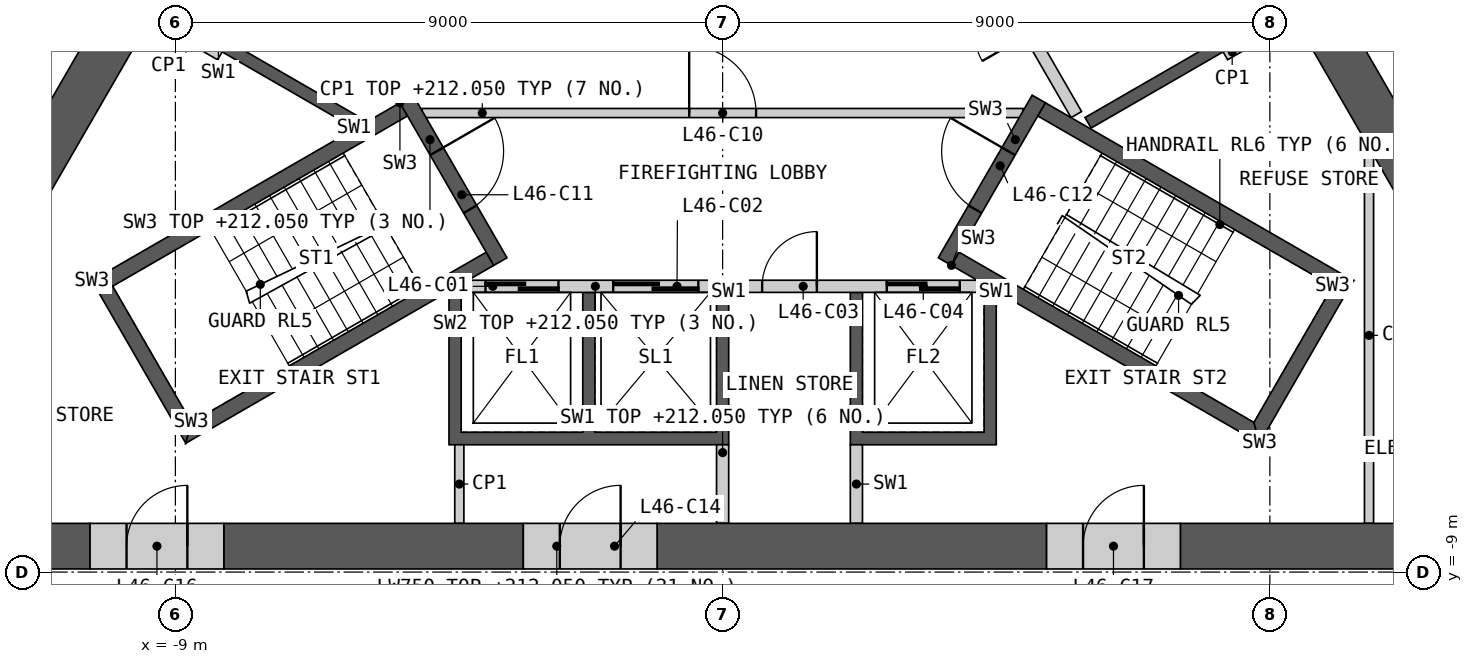
"""IFC4 building model, lengths in metres.
Left out: names, types, materials, properties, quantities, classifications, styles, units other than length and angle.
Written with IfcOpenShell. Run it as: python <this file> out.ifc"""

import sys

from ifc_helpers import new_model, si_unit, direction, frame, frame_2d, origin, place, context, subcontext, project, spatial, polyline, rectangle, outline, extrude, element, fill, save


model = new_model("IFC4")
c1 = context("Model", 3, precision=1e-05, world=origin(), true_north=direction((0.0, 1.0)))
c2 = subcontext(c1, "Body", "Model", "MODEL_VIEW")
j1 = project(units=[si_unit("LENGTHUNIT", "METRE"), si_unit("PLANEANGLEUNIT", "RADIAN")], contexts=[c1])
p1 = place(None, origin())
s1 = spatial("IfcSite", under=j1, at=p1, CompositionType="ELEMENT")
p2 = place(p1, origin())
s2 = spatial("IfcBuilding", under=s1, at=p2, CompositionType="ELEMENT")
p3 = place(p2, frame((0.0, 0.0, 208.8)))
s3 = spatial("IfcBuildingStorey", under=s2, at=p3, CompositionType="ELEMENT", Elevation=208.8)
p4 = place(p3, origin())
e1 = element("IfcWall", 1, at=p4, inside=s3, PredefinedType="SHEAR", context=c2, shape_type="SweptSolid", body=[
    extrude(outline(polyline([(4.5, -4.4), (4.5, -6.906), (2.1, -6.906), (2.1, -4.4), (2.3, -4.4), (2.3, -6.7), (4.3, -6.7), (4.3, -4.4), (4.5, -4.4)])), origin(), (0.0, 0.0, 1.0), 3.25),
])
p5 = place(p3, origin())
e2 = element("IfcWall", 2, at=p5, inside=s3, PredefinedType="SHEAR", context=c2, shape_type="SweptSolid", body=[
    extrude(outline(polyline([(0.1, -4.4), (0.1, -6.906), (-4.5, -6.906), (-4.5, -4.4), (-4.3, -4.4), (-4.3, -6.7), (-2.3, -6.7), (-2.3, -4.4), (-2.1, -4.4), (-2.1, -6.7), (-0.1, -6.7), (-0.1, -4.4), (0.1, -4.4)])), origin(), (0.0, 0.0, 1.0), 3.25),
])
p6 = place(p3, frame((-4.187, -4.3, 0.0), z_axis=(0.0, 0.0, 1.0), x_axis=(1.0, 0.0, 0.0)))
e3 = element("IfcWall", 3, at=p6, inside=s3, PredefinedType="SOLIDWALL", context=c2, shape_type="SweptSolid", body=[
    extrude(rectangle(XDim=8.373, YDim=0.2, at=frame_2d((4.187, 0.0))), origin(), (0.0, 0.0, 1.0), 3.25),
])
p7 = place(p6, frame((0.287, 0.0, 0.0)))
e4 = element("IfcOpeningElement", 4, at=p7, cuts=e3, PredefinedType="OPENING", context=c2, shape_type="SweptSolid", body=[
    extrude(rectangle(XDim=1.2, YDim=2.1, at=frame_2d((0.6, 1.05))), frame((0.0, 0.11, 0.0), z_axis=(0.0, -1.0, 0.0), x_axis=(1.0, 0.0, 0.0)), (0.0, 0.0, 1.0), 0.22),
])
p8 = place(p6, frame((2.387, 0.0, 0.0)))
e5 = element("IfcOpeningElement", 5, at=p8, cuts=e3, PredefinedType="OPENING", context=c2, shape_type="SweptSolid", body=[
    extrude(rectangle(XDim=1.4, YDim=2.1, at=frame_2d((0.7, 1.05))), frame((0.0, 0.11, 0.0), z_axis=(0.0, -1.0, 0.0), x_axis=(1.0, 0.0, 0.0)), (0.0, 0.0, 1.0), 0.22),
])
p9 = place(p6, frame((4.837, 0.0, 0.0)))
e6 = element("IfcOpeningElement", 6, at=p9, cuts=e3, PredefinedType="OPENING", context=c2, shape_type="SweptSolid", body=[
    extrude(rectangle(XDim=0.9, YDim=2.1, at=frame_2d((0.45, 1.05))), frame((0.0, 0.11, 0.0), z_axis=(0.0, -1.0, 0.0), x_axis=(1.0, 0.0, 0.0)), (0.0, 0.0, 1.0), 0.22),
])
p10 = place(p6, frame((6.887, 0.0, 0.0)))
e7 = element("IfcOpeningElement", 7, at=p10, cuts=e3, PredefinedType="OPENING", context=c2, shape_type="SweptSolid", body=[
    extrude(rectangle(XDim=1.2, YDim=2.1, at=frame_2d((0.6, 1.05))), frame((0.0, 0.11, 0.0), z_axis=(0.0, -1.0, 0.0), x_axis=(1.0, 0.0, 0.0)), (0.0, 0.0, 1.0), 0.22),
])
for number, where, z_axis, x_axis in (
    (8, (0.0, -6.906, 0.0), (0.0, 0.0, 1.0), (0.0, -1.0, 0.0)),
    (9, (2.2, -6.906, 0.0), (0.0, 0.0, 1.0), (0.0, -1.0, 0.0)),
):
    element("IfcWall", number, at=place(p3, frame(where, z_axis=z_axis, x_axis=x_axis)), inside=s3, PredefinedType="SHEAR", context=c2, shape_type="SweptSolid", body=[
        extrude(rectangle(XDim=1.293, YDim=0.2, at=frame_2d((0.646, 0.0))), origin(), (0.0, 0.0, 1.0), 3.25),
    ])
p11 = place(p3, origin())
e10 = element("IfcWall", 10, at=p11, inside=s3, PredefinedType="SHEAR", context=c2, shape_type="SweptSolid", body=[
    extrude(outline(polyline([(3.76, 2.287), (5.931, 3.54), (8.231, -0.444), (6.061, -1.697), (5.96, -1.524), (7.952, -0.374), (5.852, 3.263), (3.861, 2.113), (3.76, 2.287)])), origin(), (0.0, 0.0, 1.0), 3.25),
])
p12 = place(p3, frame((5.817, -1.476, 0.0), z_axis=(0.0, 0.0, 1.0), x_axis=(-0.500002616675, 0.866023893041, 0.0)))
e11 = element("IfcWall", 11, at=p12, inside=s3, PredefinedType="SOLIDWALL", context=c2, shape_type="SweptSolid", body=[
    extrude(rectangle(XDim=8.373, YDim=0.2, at=frame_2d((4.187, 0.0))), origin(), (0.0, 0.0, 1.0), 3.25),
])
p13 = place(p12, frame((1.537, 0.0, 0.0)))
e12 = element("IfcOpeningElement", 12, at=p13, cuts=e11, PredefinedType="OPENING", context=c2, shape_type="SweptSolid", body=[
    extrude(rectangle(XDim=0.9, YDim=2.1, at=frame_2d((0.45, 1.05))), frame((0.0, 0.11, 0.0), z_axis=(0.0, -1.0, 0.0), x_axis=(1.0, 0.0, 0.0)), (0.0, 0.0, 1.0), 0.22),
])
p14 = place(p12, frame((4.837, 0.0, 0.0)))
e13 = element("IfcOpeningElement", 13, at=p14, cuts=e11, PredefinedType="OPENING", context=c2, shape_type="SweptSolid", body=[
    extrude(rectangle(XDim=0.9, YDim=2.1, at=frame_2d((0.45, 1.05))), frame((0.0, 0.11, 0.0), z_axis=(0.0, -1.0, 0.0), x_axis=(1.0, 0.0, 0.0)), (0.0, 0.0, 1.0), 0.22),
])
p15 = place(p12, frame((6.937, 0.0, 0.0)))
e14 = element("IfcOpeningElement", 14, at=p15, cuts=e11, PredefinedType="OPENING", context=c2, shape_type="SweptSolid", body=[
    extrude(rectangle(XDim=1.1, YDim=2.1, at=frame_2d((0.55, 1.05))), frame((0.0, 0.11, 0.0), z_axis=(0.0, -1.0, 0.0), x_axis=(1.0, 0.0, 0.0)), (0.0, 0.0, 1.0), 0.22),
])
p16 = place(p3, origin())
e15 = element("IfcWall", 15, at=p16, inside=s3, PredefinedType="SHEAR", context=c2, shape_type="SweptSolid", body=[
    extrude(outline(polyline([(-6.061, -1.697), (-8.231, -0.444), (-8.131, -0.271), (-5.96, -1.524), (-6.061, -1.697)])), origin(), (0.0, 0.0, 1.0), 3.25),
])
p17 = place(p3, frame((-4.941, -1.45, 0.0), z_axis=(0.0, 0.0, 1.0), x_axis=(1.0, 0.0, 0.0)))
e16 = element("IfcWall", 16, at=p17, inside=s3, PredefinedType="PARTITIONING", context=c2, shape_type="SweptSolid", body=[
    extrude(rectangle(XDim=9.882, YDim=0.15, at=frame_2d((4.941, 0.0))), origin(), (0.0, 0.0, 1.0), 3.25),
])
p18 = place(p17, frame((4.391, 0.0, 0.0)))
e17 = element("IfcOpeningElement", 17, at=p18, cuts=e16, PredefinedType="OPENING", context=c2, shape_type="SweptSolid", body=[
    extrude(rectangle(XDim=1.1, YDim=2.1, at=frame_2d((0.55, 1.05))), frame((0.0, 0.085, 0.0), z_axis=(0.0, -1.0, 0.0), x_axis=(1.0, 0.0, 0.0)), (0.0, 0.0, 1.0), 0.17),
])
p19 = place(p3, origin())
e18 = element("IfcWall", 18, at=p19, inside=s3, PredefinedType="SHEAR", context=c2, shape_type="SweptSolid", body=[
    extrude(outline(polyline([(-5.307, -1.281), (-10.374, -4.206), (-10.032, -4.298), (-5.182, -1.498), (-5.307, -1.281)])), origin(), (0.0, 0.0, 1.0), 3.25),
])
p20 = place(p3, origin())
e19 = element("IfcWall", 19, at=p20, inside=s3, PredefinedType="SHEAR", context=c2, shape_type="SweptSolid", body=[
    extrude(outline(polyline([(-10.374, -4.206), (-8.83, -6.881), (-8.738, -6.539), (-10.032, -4.298), (-10.374, -4.206)])), origin(), (0.0, 0.0, 1.0), 3.25),
])
p21 = place(p3, origin())
e20 = element("IfcWall", 20, at=p21, inside=s3, PredefinedType="SHEAR", context=c2, shape_type="SweptSolid", body=[
    extrude(outline(polyline([(-8.738, -6.539), (-8.83, -6.881), (-3.763, -3.956), (-3.888, -3.739), (-8.738, -6.539)])), origin(), (0.0, 0.0, 1.0), 3.25),
])
p22 = place(p3, frame((-5.199, -1.219, 0.0), z_axis=(0.0, 0.0, 1.0), x_axis=(0.499982516597, -0.866035497597, 0.0)))
e21 = element("IfcWall", 21, at=p22, inside=s3, PredefinedType="SHEAR", context=c2, shape_type="SweptSolid", body=[
    extrude(rectangle(XDim=3.088, YDim=0.25, at=frame_2d((1.544, 0.0))), origin(), (0.0, 0.0, 1.0), 3.25),
])
p23 = place(p22, frame((0.994, 0.0, 0.0)))
e22 = element("IfcOpeningElement", 22, at=p23, cuts=e21, PredefinedType="OPENING", context=c2, shape_type="SweptSolid", body=[
    extrude(rectangle(XDim=1.1, YDim=2.1, at=frame_2d((0.55, 1.05))), frame((0.0, 0.135, 0.0), z_axis=(0.0, -1.0, 0.0), x_axis=(1.0, 0.0, 0.0)), (0.0, 0.0, 1.0), 0.27),
])
p24 = place(p3, origin())
e23 = element("IfcWall", 23, at=p24, inside=s3, PredefinedType="SHEAR", context=c2, shape_type="SweptSolid", body=[
    extrude(outline(polyline([(3.763, -3.956), (8.83, -6.881), (8.738, -6.539), (3.888, -3.739), (3.763, -3.956)])), origin(), (0.0, 0.0, 1.0), 3.25),
])
p25 = place(p3, origin())
e24 = element("IfcWall", 24, at=p25, inside=s3, PredefinedType="SHEAR", context=c2, shape_type="SweptSolid", body=[
    extrude(outline(polyline([(8.83, -6.881), (10.374, -4.206), (10.032, -4.298), (8.738, -6.539), (8.83, -6.881)])), origin(), (0.0, 0.0, 1.0), 3.25),
])
p26 = place(p3, origin())
e25 = element("IfcWall", 25, at=p26, inside=s3, PredefinedType="SHEAR", context=c2, shape_type="SweptSolid", body=[
    extrude(outline(polyline([(10.032, -4.298), (10.374, -4.206), (5.307, -1.281), (5.182, -1.498), (10.032, -4.298)])), origin(), (0.0, 0.0, 1.0), 3.25),
])
p27 = place(p3, frame((3.655, -3.893, 0.0), z_axis=(0.0, 0.0, 1.0), x_axis=(0.499982516597, 0.866035497597, 0.0)))
e26 = element("IfcWall", 26, at=p27, inside=s3, PredefinedType="SHEAR", context=c2, shape_type="SweptSolid", body=[
    extrude(rectangle(XDim=3.088, YDim=0.25, at=frame_2d((1.544, 0.0))), origin(), (0.0, 0.0, 1.0), 3.25),
])
p28 = place(p27, frame((0.994, 0.0, 0.0)))
e27 = element("IfcOpeningElement", 27, at=p28, cuts=e26, PredefinedType="OPENING", context=c2, shape_type="SweptSolid", body=[
    extrude(rectangle(XDim=1.1, YDim=2.1, at=frame_2d((0.55, 1.05))), frame((0.0, 0.135, 0.0), z_axis=(0.0, -1.0, 0.0), x_axis=(1.0, 0.0, 0.0)), (0.0, 0.0, 1.0), 0.27),
])
for number, where, z_axis, x_axis in (
    (28, (8.268, -0.509, 0.0), (0.0, 0.0, 1.0), (0.866, 0.5, 0.0)),
    (29, (-8.268, -0.509, 0.0), (0.0, 0.0, 1.0), (-0.866, 0.5, 0.0)),
    (30, (-4.33, -8.199, 0.0), (0.0, 0.0, 1.0), (0.0, 1.0, 0.0)),
):
    element("IfcWall", number, at=place(p3, frame(where, z_axis=z_axis, x_axis=x_axis)), inside=s3, PredefinedType="PARTITIONING", context=c2, shape_type="SweptSolid", body=[
        extrude(rectangle(XDim=1.293, YDim=0.15, at=frame_2d((0.646, 0.0))), origin(), (0.0, 0.0, 1.0), 3.25),
    ])
p29 = place(p3, frame((10.631, -8.199, 0.0), z_axis=(0.0, 0.0, 1.0), x_axis=(0.0, 1.0, 0.0)))
e31 = element("IfcWall", 31, at=p29, inside=s3, PredefinedType="PARTITIONING", context=c2, shape_type="SweptSolid", body=[
    extrude(rectangle(XDim=6.184, YDim=0.15, at=frame_2d((3.092, 0.0))), origin(), (0.0, 0.0, 1.0), 3.25),
])
p30 = place(p3, frame((7.528, -8.574, 0.0), z_axis=(0.0, 0.0, 1.0), x_axis=(1.0, 0.0, 0.0)))
e32 = element("IfcWall", 32, at=p30, inside=s3, PredefinedType="SHEAR", context=c2, shape_type="SweptSolid", body=[
    extrude(rectangle(XDim=6.673, YDim=0.75, at=frame_2d((3.336, 0.0))), origin(), (0.0, 0.0, 1.0), 3.25),
])
p31 = place(p3, frame((-1.078, -8.574, 0.0), z_axis=(0.0, 0.0, 1.0), x_axis=(1.0, 0.0, 0.0)))
e33 = element("IfcWall", 33, at=p31, inside=s3, PredefinedType="SHEAR", context=c2, shape_type="SweptSolid", body=[
    extrude(rectangle(XDim=6.406, YDim=0.75, at=frame_2d((3.203, 0.0))), origin(), (0.0, 0.0, 1.0), 3.25),
])
p32 = place(p3, frame((-8.203, -8.574, 0.0), z_axis=(0.0, 0.0, 1.0), x_axis=(1.0, 0.0, 0.0)))
e34 = element("IfcWall", 34, at=p32, inside=s3, PredefinedType="SHEAR", context=c2, shape_type="SweptSolid", body=[
    extrude(rectangle(XDim=4.926, YDim=0.75, at=frame_2d((2.463, 0.0))), origin(), (0.0, 0.0, 1.0), 3.25),
])
p33 = place(p3, frame((-14.201, -8.574, 0.0), z_axis=(0.0, 0.0, 1.0), x_axis=(1.0, 0.0, 0.0)))
e35 = element("IfcWall", 35, at=p33, inside=s3, PredefinedType="SHEAR", context=c2, shape_type="SweptSolid", body=[
    extrude(rectangle(XDim=3.798, YDim=0.75, at=frame_2d((1.899, 0.0))), origin(), (0.0, 0.0, 1.0), 3.25),
])
p34 = place(p3, frame((12.228, -4.032, 0.0), z_axis=(0.0, 0.0, 1.0), x_axis=(-0.499993760127, 0.866029006347, 0.0)))
e36 = element("IfcWall", 36, at=p34, inside=s3, PredefinedType="SHEAR", context=c2, shape_type="SweptSolid", body=[
    extrude(rectangle(XDim=6.206, YDim=0.75, at=frame_2d((3.103, 0.0))), origin(), (0.0, 0.0, 1.0), 3.25),
])
p35 = place(p3, frame((-9.625, 0.477, 0.0), z_axis=(0.0, 0.0, 1.0), x_axis=(-0.499986234705, -0.866033351035, 0.0)))
e37 = element("IfcWall", 37, at=p35, inside=s3, PredefinedType="SHEAR", context=c2, shape_type="SweptSolid", body=[
    extrude(rectangle(XDim=9.801, YDim=0.75, at=frame_2d((4.9, 0.0))), origin(), (0.0, 0.0, 1.0), 3.25),
])
p36 = place(p3, frame((-3.278, -8.574, 0.0), z_axis=(0.0, 0.0, 1.0), x_axis=(1.0, 0.0, 0.0)))
e38 = element("IfcWall", 38, at=p36, inside=s3, PredefinedType="SHEAR", context=c2, shape_type="SweptSolid", body=[
    extrude(rectangle(XDim=2.2, YDim=0.75, at=frame_2d((1.1, 0.0))), origin(), (0.0, 0.0, 1.0), 3.25),
])
p37 = place(p36, frame((0.6, 0.0, 0.0)))
e39 = element("IfcOpeningElement", 39, at=p37, cuts=e38, PredefinedType="OPENING", context=c2, shape_type="SweptSolid", body=[
    extrude(rectangle(XDim=1.0, YDim=2.1, at=frame_2d((0.5, 1.05))), frame((0.0, 0.385, 0.0), z_axis=(0.0, -1.0, 0.0), x_axis=(1.0, 0.0, 0.0)), (0.0, 0.0, 1.0), 0.77),
])
p38 = place(p3, frame((-10.403, -8.574, 0.0), z_axis=(0.0, 0.0, 1.0), x_axis=(1.0, 0.0, 0.0)))
e40 = element("IfcWall", 40, at=p38, inside=s3, PredefinedType="SHEAR", context=c2, shape_type="SweptSolid", body=[
    extrude(rectangle(XDim=2.2, YDim=0.75, at=frame_2d((1.1, 0.0))), origin(), (0.0, 0.0, 1.0), 3.25),
])
p39 = place(p38, frame((0.6, 0.0, 0.0)))
e41 = element("IfcOpeningElement", 41, at=p39, cuts=e40, PredefinedType="OPENING", context=c2, shape_type="SweptSolid", body=[
    extrude(rectangle(XDim=1.0, YDim=2.1, at=frame_2d((0.5, 1.05))), frame((0.0, 0.385, 0.0), z_axis=(0.0, -1.0, 0.0), x_axis=(1.0, 0.0, 0.0)), (0.0, 0.0, 1.0), 0.77),
])
p40 = place(p3, frame((5.328, -8.574, 0.0), z_axis=(0.0, 0.0, 1.0), x_axis=(1.0, 0.0, 0.0)))
e42 = element("IfcWall", 42, at=p40, inside=s3, PredefinedType="SHEAR", context=c2, shape_type="SweptSolid", body=[
    extrude(rectangle(XDim=2.2, YDim=0.75, at=frame_2d((1.1, 0.0))), origin(), (0.0, 0.0, 1.0), 3.25),
])
p41 = place(p40, frame((0.6, 0.0, 0.0)))
e43 = element("IfcOpeningElement", 43, at=p41, cuts=e42, PredefinedType="OPENING", context=c2, shape_type="SweptSolid", body=[
    extrude(rectangle(XDim=1.0, YDim=2.1, at=frame_2d((0.5, 1.05))), frame((0.0, 0.385, 0.0), z_axis=(0.0, -1.0, 0.0), x_axis=(1.0, 0.0, 0.0)), (0.0, 0.0, 1.0), 0.77),
])
p42 = place(p3, frame((5.377, 19.385, 0.0), z_axis=(0.0, 0.0, 1.0), x_axis=(0.500000757641, -0.86602496636, 0.0)))
e44 = element("IfcWall", 44, at=p42, inside=s3, PredefinedType="PARTITIONING", context=c2, shape_type="SweptSolid", body=[
    extrude(rectangle(XDim=28.198, YDim=0.2, at=frame_2d((14.099, 0.0))), origin(), (0.0, 0.0, 1.0), 3.25),
])
p43 = place(p42, frame((25.345, 0.0, 0.0)))
e45 = element("IfcOpeningElement", 45, at=p43, cuts=e44, PredefinedType="OPENING", context=c2, shape_type="SweptSolid", body=[
    extrude(rectangle(XDim=1.8, YDim=2.1, at=frame_2d((0.9, 1.05))), frame((0.0, 0.11, 0.0), z_axis=(0.0, -1.0, 0.0), x_axis=(1.0, 0.0, 0.0)), (0.0, 0.0, 1.0), 0.22),
])
p44 = place(p42, frame((19.621, 0.0, 0.0)))
e46 = element("IfcOpeningElement", 46, at=p44, cuts=e44, PredefinedType="OPENING", context=c2, shape_type="SweptSolid", body=[
    extrude(rectangle(XDim=1.0, YDim=2.1, at=frame_2d((0.5, 1.05))), frame((0.0, 0.11, 0.0), z_axis=(0.0, -1.0, 0.0), x_axis=(1.0, 0.0, 0.0)), (0.0, 0.0, 1.0), 0.22),
])
p45 = place(p42, frame((16.409, 0.0, 0.0)))
e47 = element("IfcOpeningElement", 47, at=p45, cuts=e44, PredefinedType="OPENING", context=c2, shape_type="SweptSolid", body=[
    extrude(rectangle(XDim=1.1, YDim=2.1, at=frame_2d((0.55, 1.05))), frame((0.0, 0.11, 0.0), z_axis=(0.0, -1.0, 0.0), x_axis=(1.0, 0.0, 0.0)), (0.0, 0.0, 1.0), 0.22),
])
p46 = place(p42, frame((1.452, 0.0, 0.0)))
e48 = element("IfcOpeningElement", 48, at=p46, cuts=e44, PredefinedType="OPENING", context=c2, shape_type="SweptSolid", body=[
    extrude(rectangle(XDim=0.95, YDim=2.1, at=frame_2d((0.475, 1.05))), frame((0.0, 0.11, 0.0), z_axis=(0.0, -1.0, 0.0), x_axis=(1.0, 0.0, 0.0)), (0.0, 0.0, 1.0), 0.22),
])
p47 = place(p3, frame((-14.619, -2.624, 0.0), z_axis=(0.0, 0.0, 1.0), x_axis=(0.50000393355, 0.866023132736, 0.0)))
e49 = element("IfcWall", 49, at=p47, inside=s3, PredefinedType="PARTITIONING", context=c2, shape_type="SweptSolid", body=[
    extrude(rectangle(XDim=9.335, YDim=0.2, at=frame_2d((4.667, 0.0))), origin(), (0.0, 0.0, 1.0), 3.25),
])
p48 = place(p47, frame((3.062, 0.0, 0.0)))
e50 = element("IfcOpeningElement", 50, at=p48, cuts=e49, PredefinedType="OPENING", context=c2, shape_type="SweptSolid", body=[
    extrude(rectangle(XDim=1.0, YDim=2.1, at=frame_2d((0.5, 1.05))), frame((0.0, 0.11, 0.0), z_axis=(0.0, -1.0, 0.0), x_axis=(1.0, 0.0, 0.0)), (0.0, 0.0, 1.0), 0.22),
])
p49 = place(p7, origin())
e51 = element("IfcDoor", 51, at=p49, inside=s3, OperationType="SLIDING_TO_LEFT", PredefinedType="DOOR", context=c2, shape_type="SweptSolid", body=[
    extrude(rectangle(XDim=1.2, YDim=2.1, at=frame_2d((0.6, 1.05))), frame((0.0, 0.025, 0.0), z_axis=(0.0, -1.0, 0.0), x_axis=(1.0, 0.0, 0.0)), (0.0, 0.0, 1.0), 0.05),
])
fill(e4, e51)
p50 = place(p8, origin())
e52 = element("IfcDoor", 52, at=p50, inside=s3, OperationType="SLIDING_TO_LEFT", PredefinedType="DOOR", context=c2, shape_type="SweptSolid", body=[
    extrude(rectangle(XDim=1.4, YDim=2.1, at=frame_2d((0.7, 1.05))), frame((0.0, 0.025, 0.0), z_axis=(0.0, -1.0, 0.0), x_axis=(1.0, 0.0, 0.0)), (0.0, 0.0, 1.0), 0.05),
])
fill(e5, e52)
p51 = place(p9, origin())
e53 = element("IfcDoor", 53, at=p51, inside=s3, OperationType="SINGLE_SWING_RIGHT", PredefinedType="DOOR", context=c2, shape_type="SweptSolid", body=[
    extrude(rectangle(XDim=0.9, YDim=2.1, at=frame_2d((0.45, 1.05))), frame((0.0, 0.025, 0.0), z_axis=(0.0, -1.0, 0.0), x_axis=(1.0, 0.0, 0.0)), (0.0, 0.0, 1.0), 0.05),
])
fill(e6, e53)
p52 = place(p10, origin())
e54 = element("IfcDoor", 54, at=p52, inside=s3, OperationType="SLIDING_TO_LEFT", PredefinedType="DOOR", context=c2, shape_type="SweptSolid", body=[
    extrude(rectangle(XDim=1.2, YDim=2.1, at=frame_2d((0.6, 1.05))), frame((0.0, 0.025, 0.0), z_axis=(0.0, -1.0, 0.0), x_axis=(1.0, 0.0, 0.0)), (0.0, 0.0, 1.0), 0.05),
])
fill(e7, e54)
p53 = place(p18, origin())
e55 = element("IfcDoor", 55, at=p53, inside=s3, OperationType="SINGLE_SWING_LEFT", PredefinedType="DOOR", context=c2, shape_type="SweptSolid", body=[
    extrude(rectangle(XDim=1.1, YDim=2.1, at=frame_2d((0.55, 1.05))), frame((0.0, 0.025, 0.0), z_axis=(0.0, -1.0, 0.0), x_axis=(1.0, 0.0, 0.0)), (0.0, 0.0, 1.0), 0.05),
])
fill(e17, e55)
p54 = place(p23, origin())
e56 = element("IfcDoor", 56, at=p54, inside=s3, OperationType="SINGLE_SWING_LEFT", PredefinedType="DOOR", context=c2, shape_type="SweptSolid", body=[
    extrude(rectangle(XDim=1.1, YDim=2.1, at=frame_2d((0.55, 1.05))), frame((0.0, 0.025, 0.0), z_axis=(0.0, -1.0, 0.0), x_axis=(1.0, 0.0, 0.0)), (0.0, 0.0, 1.0), 0.05),
])
fill(e22, e56)
p55 = place(p28, origin())
e57 = element("IfcDoor", 57, at=p55, inside=s3, OperationType="SINGLE_SWING_RIGHT", PredefinedType="DOOR", context=c2, shape_type="SweptSolid", body=[
    extrude(rectangle(XDim=1.1, YDim=2.1, at=frame_2d((0.55, 1.05))), frame((0.0, 0.025, 0.0), z_axis=(0.0, -1.0, 0.0), x_axis=(1.0, 0.0, 0.0)), (0.0, 0.0, 1.0), 0.05),
])
fill(e27, e57)
p56 = place(p37, origin())
e58 = element("IfcDoor", 58, at=p56, inside=s3, OperationType="SINGLE_SWING_RIGHT", PredefinedType="DOOR", context=c2, shape_type="SweptSolid", body=[
    extrude(rectangle(XDim=1.0, YDim=2.1, at=frame_2d((0.5, 1.05))), frame((0.0, 0.13, 0.0), z_axis=(0.0, -1.0, 0.0), x_axis=(1.0, 0.0, 0.0)), (0.0, 0.0, 1.0), 0.05),
])
fill(e39, e58)
p57 = place(p39, origin())
e59 = element("IfcDoor", 59, at=p57, inside=s3, OperationType="SINGLE_SWING_RIGHT", PredefinedType="DOOR", context=c2, shape_type="SweptSolid", body=[
    extrude(rectangle(XDim=1.0, YDim=2.1, at=frame_2d((0.5, 1.05))), frame((0.0, 0.13, 0.0), z_axis=(0.0, -1.0, 0.0), x_axis=(1.0, 0.0, 0.0)), (0.0, 0.0, 1.0), 0.05),
])
fill(e41, e59)
p58 = place(p41, origin())
e60 = element("IfcDoor", 60, at=p58, inside=s3, OperationType="SINGLE_SWING_RIGHT", PredefinedType="DOOR", context=c2, shape_type="SweptSolid", body=[
    extrude(rectangle(XDim=1.0, YDim=2.1, at=frame_2d((0.5, 1.05))), frame((0.0, 0.13, 0.0), z_axis=(0.0, -1.0, 0.0), x_axis=(1.0, 0.0, 0.0)), (0.0, 0.0, 1.0), 0.05),
])
fill(e43, e60)
save(model, sys.argv[1])
